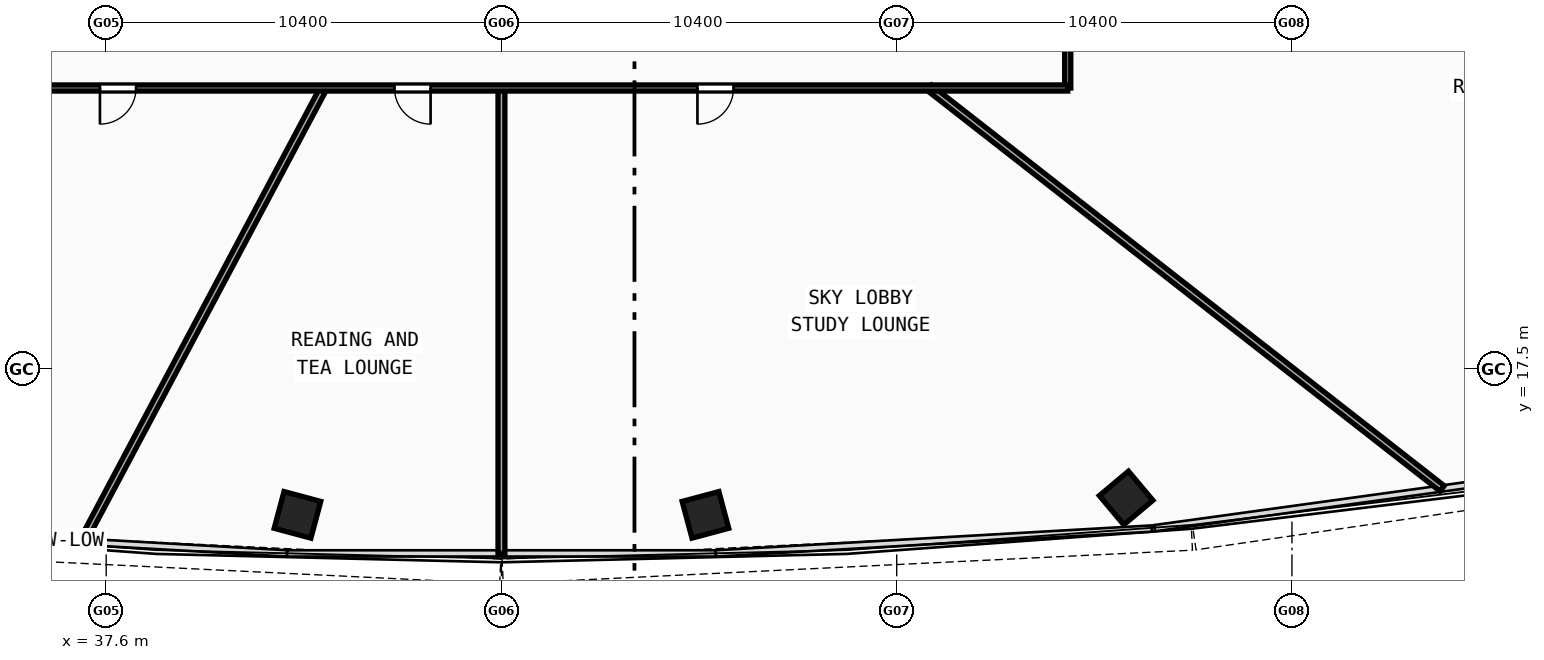
"""IFC4 building model, lengths in metres.
Left out: names, types, materials, properties, quantities, classifications, styles, units other than length and angle.
Written with IfcOpenShell. Run it as: python <this file> out.ifc"""

import sys

from ifc_helpers import new_model, si_unit, direction, frame, frame_2d, origin, origin_with_axes, origin_2d, place, context, subcontext, project, spatial, rectangle, hollow_rectangle, extrude, source, transform, mapped, element, fill, save


model = new_model("IFC4")
c1 = context("Model", 3, precision=1e-05, world=origin(), true_north=direction((0.0, 1.0)))
c2 = subcontext(c1, "Body", "Model", "MODEL_VIEW")
j1 = project(units=[si_unit("LENGTHUNIT", "METRE"), si_unit("PLANEANGLEUNIT", "RADIAN")], contexts=[c1])
p1 = place(None, origin())
s1 = spatial("IfcSite", under=j1, at=p1, CompositionType="ELEMENT")
p2 = place(p1, origin())
s2 = spatial("IfcBuilding", under=s1, at=p2, CompositionType="ELEMENT")
p3 = place(p2, frame((0.0, 0.0, 119.18)))
s3 = spatial("IfcBuildingStorey", under=s2, at=p3, CompositionType="ELEMENT", Elevation=119.18)
m1 = source(origin(), c2, "Body", "SweptSolid", [
    extrude(hollow_rectangle(XDim=1.0, YDim=1.0, WallThickness=0.042, at=origin_2d()), origin(), (0.0, 0.0, 1.0), 5.85),
])
for number, where, z_axis, x_axis in (
    (1, (42.633, 13.668, -0.28), (0.0, 0.0, 1.0), (0.966, -0.259, 0.0)),
    (2, (53.367, 13.668, -0.28), (0.0, 0.0, 1.0), (0.966, 0.259, 0.0)),
    (3, (64.436, 14.112, -0.28), (0.0, 0.0, 1.0), (0.766, 0.643, 0.0)),
):
    element("IfcColumn", number, at=place(p3, frame(where, z_axis=z_axis, x_axis=x_axis)), inside=s3, PredefinedType="COLUMN", context=c2, shape_type="MappedRepresentation", body=[
        mapped(m1, transform((0.0, 0.0, 0.0), scale=1.0)),
    ])
p4 = place(p3, frame((43.321, 24.9, 0.0), z_axis=(0.0, 0.0, 1.0), x_axis=(-0.46948390868, -0.88294102832, 0.0)))
e4 = element("IfcWall", 4, at=p4, inside=s3, PredefinedType="PARTITIONING", context=c2, shape_type="SweptSolid", body=[
    extrude(rectangle(XDim=13.521, YDim=0.18, at=frame_2d((6.761, 0.0))), origin(), (0.0, 0.0, 1.0), 4.87),
])
p5 = place(p3, frame((48.0, 24.9, 0.0), z_axis=(0.0, 0.0, 1.0), x_axis=(0.0, -1.0, 0.0)))
e5 = element("IfcWall", 5, at=p5, inside=s3, PredefinedType="PARTITIONING", context=c2, shape_type="SweptSolid", body=[
    extrude(rectangle(XDim=12.246, YDim=0.18, at=frame_2d((6.123, 0.0))), origin(), (0.0, 0.0, 1.0), 4.87),
])
p6 = place(p3, frame((59.263, 24.9, 0.0), z_axis=(0.0, 0.0, 1.0), x_axis=(0.788013994076, -0.615657327692, 0.0)))
e6 = element("IfcWall", 6, at=p6, inside=s3, PredefinedType="PARTITIONING", context=c2, shape_type="SweptSolid", body=[
    extrude(rectangle(XDim=17.117, YDim=0.18, at=frame_2d((8.558, 0.0))), origin(), (0.0, 0.0, 1.0), 4.87),
])
p7 = place(p3, frame((62.9, 42.25, 0.0), z_axis=(0.0, 0.0, 1.0), x_axis=(0.0, -1.0, 0.0)))
e7 = element("IfcWall", 7, at=p7, inside=s3, PredefinedType="PARTITIONING", context=c2, shape_type="SweptSolid", body=[
    extrude(rectangle(XDim=17.35, YDim=0.16, at=frame_2d((8.675, 0.0))), origin(), (0.0, 0.0, 1.0), 2.22),
])
p8 = place(p7, frame((12.254, 0.0, 0.0)))
e8 = element("IfcOpeningElement", 8, at=p8, cuts=e7, PredefinedType="OPENING", context=c2, shape_type="SweptSolid", body=[
    extrude(rectangle(XDim=0.95, YDim=2.1, at=frame_2d((0.475, 1.05))), frame((0.0, 0.09, 0.0), z_axis=(0.0, -1.0, 0.0), x_axis=(1.0, 0.0, 0.0)), (0.0, 0.0, 1.0), 0.18),
])
p9 = place(p3, frame((62.9, 24.9, 0.0), z_axis=(0.0, 0.0, 1.0), x_axis=(-1.0, 0.0, 0.0)))
e9 = element("IfcWall", 9, at=p9, inside=s3, PredefinedType="PARTITIONING", context=c2, shape_type="SweptSolid", body=[
    extrude(rectangle(XDim=29.8, YDim=0.16, at=frame_2d((14.9, 0.0))), origin(), (0.0, 0.0, 1.0), 2.22),
])
p10 = place(p9, frame((24.514, 0.0, 0.0)))
e10 = element("IfcOpeningElement", 10, at=p10, cuts=e9, PredefinedType="OPENING", context=c2, shape_type="SweptSolid", body=[
    extrude(rectangle(XDim=0.95, YDim=2.1, at=frame_2d((0.475, 1.05))), frame((0.0, 0.09, 0.0), z_axis=(0.0, -1.0, 0.0), x_axis=(1.0, 0.0, 0.0)), (0.0, 0.0, 1.0), 0.18),
])
p11 = place(p9, frame((16.764, 0.0, 0.0)))
e11 = element("IfcOpeningElement", 11, at=p11, cuts=e9, PredefinedType="OPENING", context=c2, shape_type="SweptSolid", body=[
    extrude(rectangle(XDim=0.95, YDim=2.1, at=frame_2d((0.475, 1.05))), frame((0.0, 0.09, 0.0), z_axis=(0.0, -1.0, 0.0), x_axis=(1.0, 0.0, 0.0)), (0.0, 0.0, 1.0), 0.18),
])
p12 = place(p9, frame((8.793, 0.0, 0.0)))
e12 = element("IfcOpeningElement", 12, at=p12, cuts=e9, PredefinedType="OPENING", context=c2, shape_type="SweptSolid", body=[
    extrude(rectangle(XDim=0.95, YDim=2.1, at=frame_2d((0.475, 1.05))), frame((0.0, 0.09, 0.0), z_axis=(0.0, -1.0, 0.0), x_axis=(1.0, 0.0, 0.0)), (0.0, 0.0, 1.0), 0.18),
])
m2 = source(origin(), c2, "Body", "SweptSolid", [
    extrude(rectangle(XDim=0.95, YDim=2.1, at=frame_2d((0.475, 1.05))), frame((0.0, 0.025, 0.0), z_axis=(0.0, -1.0, 0.0), x_axis=(1.0, 0.0, 0.0)), (0.0, 0.0, 1.0), 0.05),
])
p13 = place(p10, origin_with_axes())
e13 = element("IfcDoor", 13, at=p13, inside=s3, OperationType="SINGLE_SWING_RIGHT", PredefinedType="DOOR", context=c2, shape_type="MappedRepresentation", body=[
    mapped(m2, transform((0.0, 0.0, 0.0), scale=1.0)),
])
fill(e10, e13)
p14 = place(p11, origin_with_axes())
e14 = element("IfcDoor", 14, at=p14, inside=s3, OperationType="SINGLE_SWING_LEFT", PredefinedType="DOOR", context=c2, shape_type="MappedRepresentation", body=[
    mapped(m2, transform((0.0, 0.0, 0.0), scale=1.0)),
])
fill(e11, e14)
p15 = place(p12, origin_with_axes())
e15 = element("IfcDoor", 15, at=p15, inside=s3, OperationType="SINGLE_SWING_RIGHT", PredefinedType="DOOR", context=c2, shape_type="MappedRepresentation", body=[
    mapped(m2, transform((0.0, 0.0, 0.0), scale=1.0)),
])
fill(e12, e15)
save(model, sys.argv[1])
